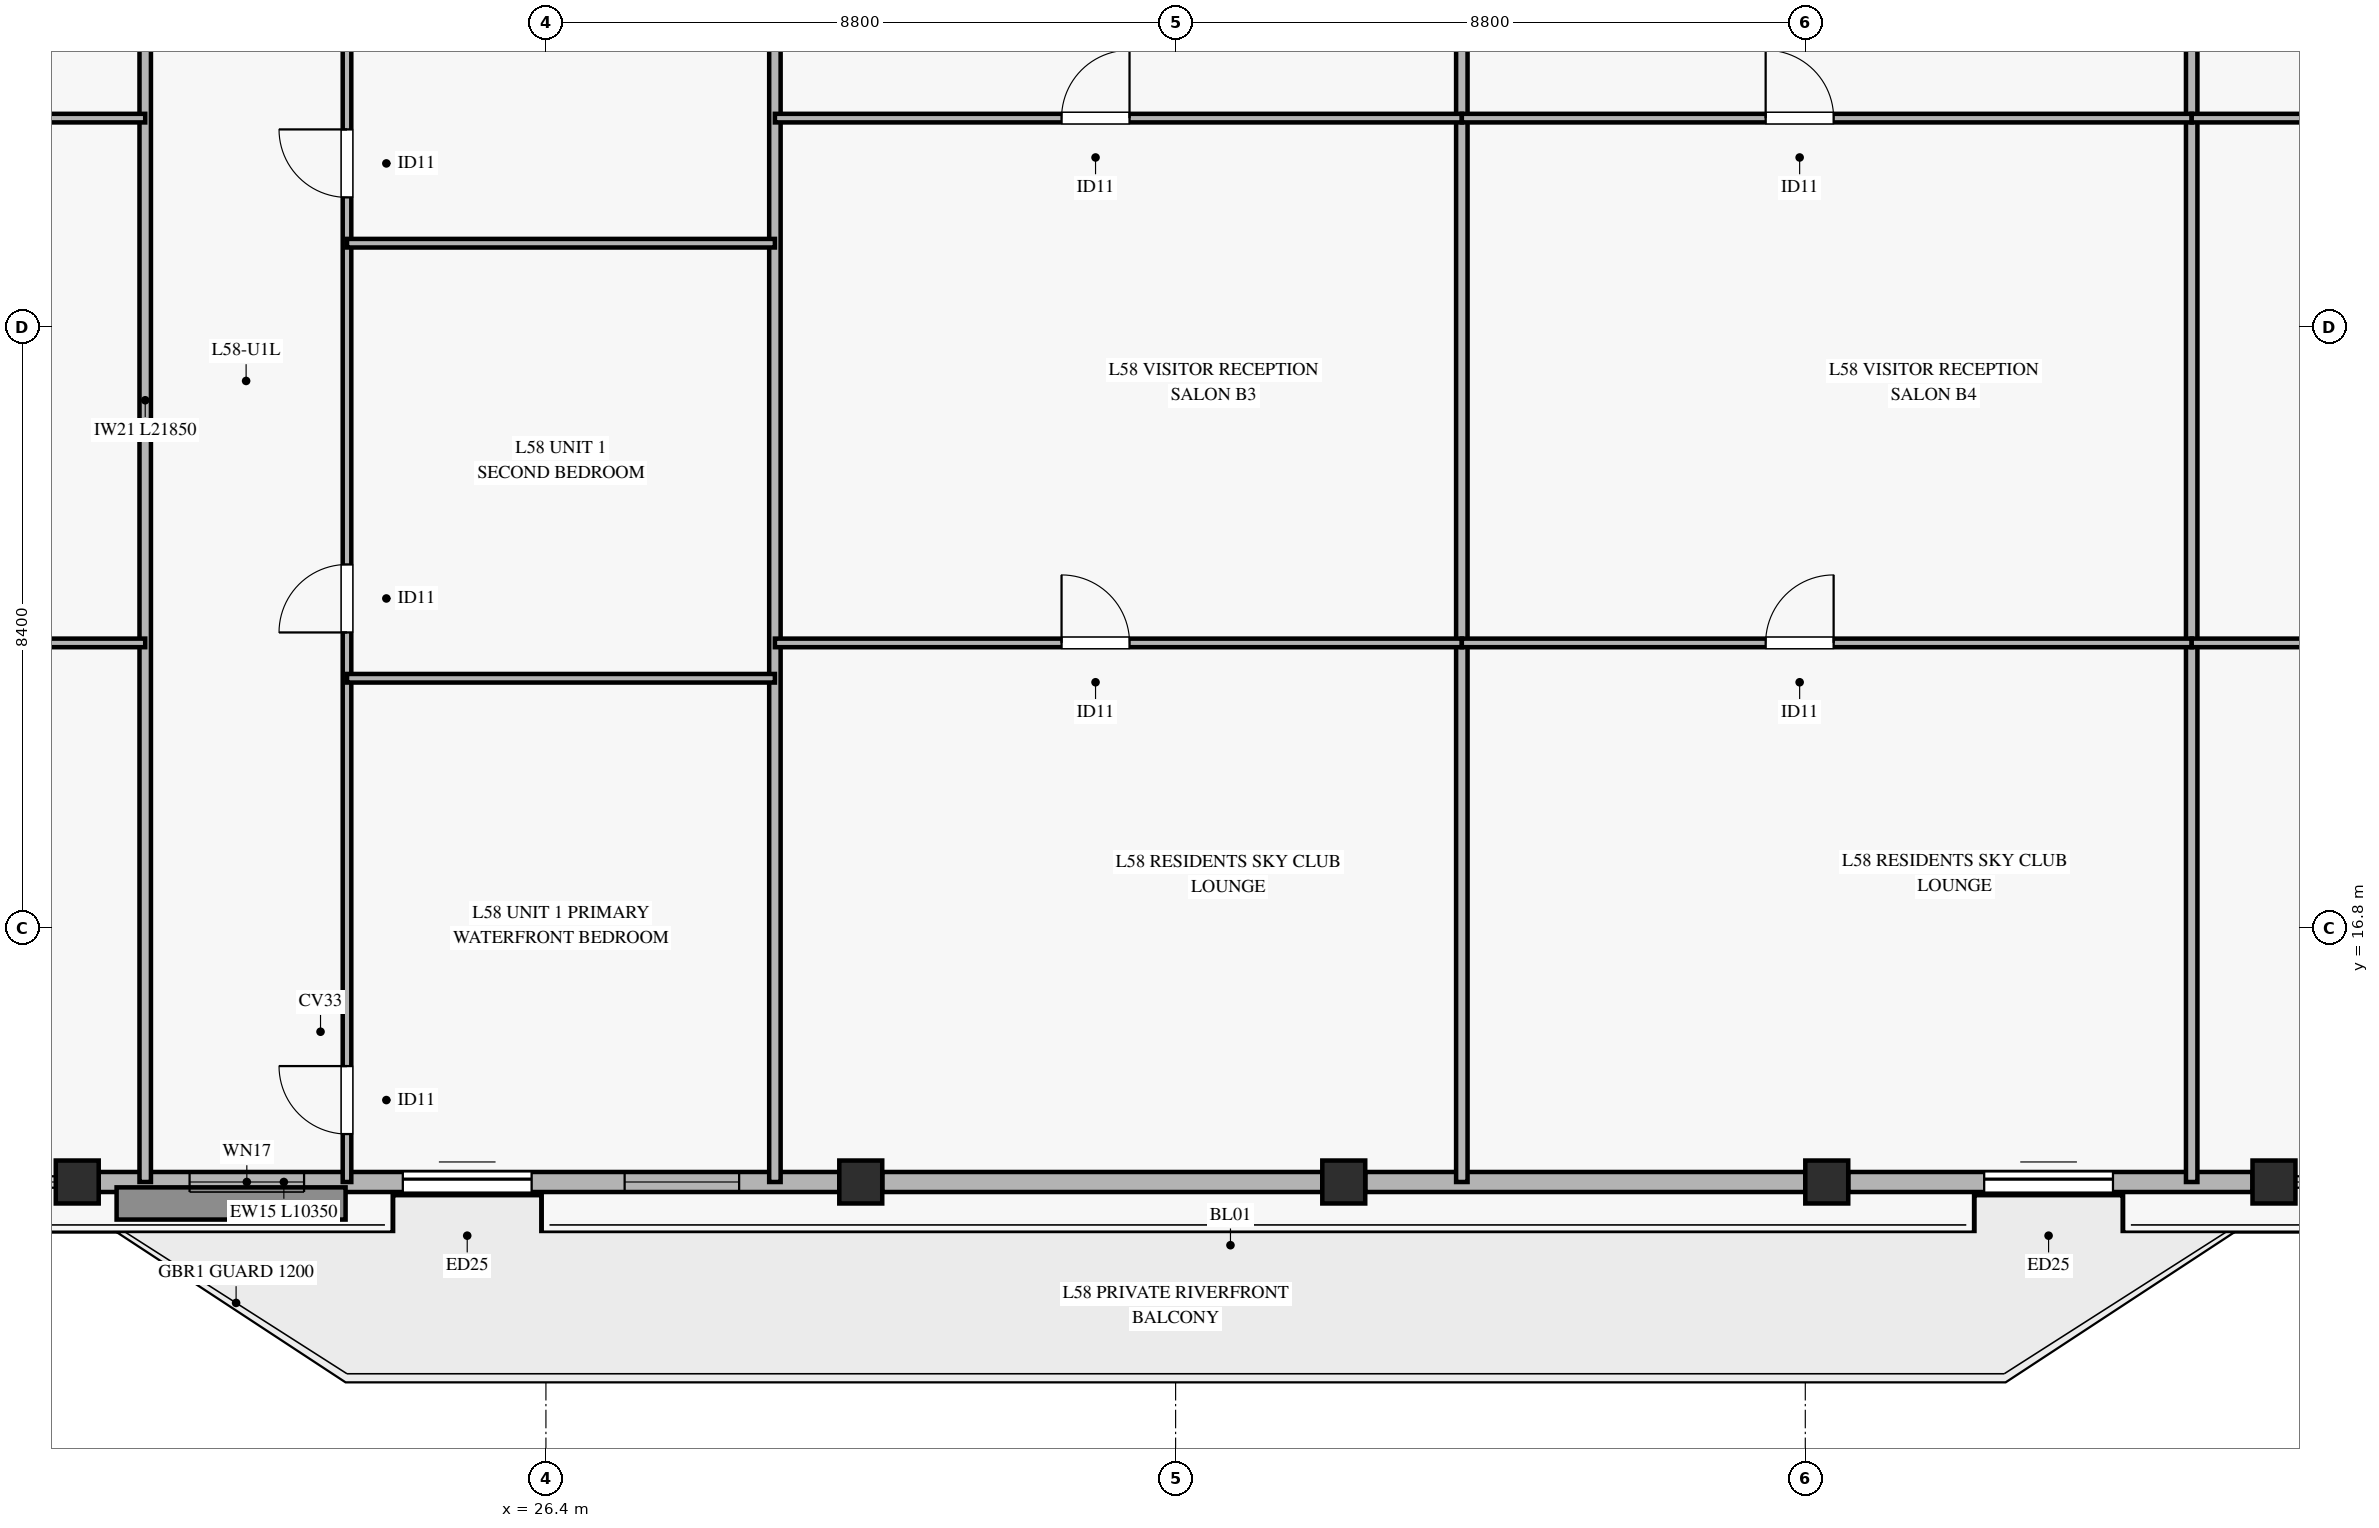
"""IFC4 building model, lengths in metres.
Left out: names, types, materials, properties, quantities, classifications, styles, units other than length and angle.
Written with IfcOpenShell. Run it as: python <this file> out.ifc"""

import sys

from ifc_helpers import new_model, si_unit, direction, frame, frame_2d, origin, origin_2d, place, context, subcontext, project, spatial, rectangle, hollow_rectangle, extrude, source, transform, mapped, element, fill, save


model = new_model("IFC4")
c1 = context("Model", 3, precision=1e-05, world=origin(), true_north=direction((0.0, 1.0)))
c2 = subcontext(c1, "Body", "Model", "MODEL_VIEW")
j1 = project(units=[si_unit("LENGTHUNIT", "METRE"), si_unit("PLANEANGLEUNIT", "RADIAN")], contexts=[c1])
p1 = place(None, origin())
s1 = spatial("IfcSite", under=j1, at=p1, CompositionType="ELEMENT")
p2 = place(p1, origin())
s2 = spatial("IfcBuilding", under=s1, at=p2, CompositionType="ELEMENT")
p3 = place(p2, frame((0.0, 0.0, 230.4)))
s3 = spatial("IfcBuildingStorey", under=s2, at=p3, CompositionType="ELEMENT", Elevation=230.4)
m1 = source(origin(), c2, "Body", "SweptSolid", [
    extrude(hollow_rectangle(XDim=0.6, YDim=0.6, WallThickness=0.028, at=origin_2d()), origin(), (0.0, 0.0, 1.0), 3.185),
])
for number, where, z_axis, x_axis in (
    (1, (19.85, 13.25, 0.0), (0.0, 0.0, 1.0), (1.0, 0.0, 0.0)),
    (2, (30.8, 13.25, 0.0), (0.0, 0.0, 1.0), (1.0, 0.0, 0.0)),
    (3, (37.55, 13.25, 0.0), (0.0, 0.0, 1.0), (1.0, 0.0, 0.0)),
    (4, (44.3, 13.25, 0.0), (0.0, 0.0, 1.0), (1.0, 0.0, 0.0)),
    (5, (50.55, 13.25, 0.0), (0.0, 0.0, 1.0), (1.0, 0.0, 0.0)),
):
    element("IfcColumn", number, at=place(p3, frame(where, z_axis=z_axis, x_axis=x_axis)), inside=s3, PredefinedType="COLUMN", context=c2, shape_type="MappedRepresentation", body=[
        mapped(m1, transform((0.0, 0.0, 0.0), x_axis=(1.0, 0.0, 0.0), y_axis=(0.0, 1.0, 0.0), z_axis=(0.0, 0.0, 1.0), scale=1.0)),
    ])
p4 = place(p3, frame((20.15, 13.25, 0.0), z_axis=(0.0, 0.0, 1.0), x_axis=(1.0, 0.0, 0.0)))
e6 = element("IfcWall", 6, at=p4, inside=s3, PredefinedType="SOLIDWALL", context=c2, shape_type="SweptSolid", body=[
    extrude(rectangle(XDim=10.35, YDim=0.28, at=frame_2d((5.175, 0.0))), origin(), (0.0, 0.0, 1.0), 2.815),
])
p5 = place(p4, frame((4.25, 0.0, 0.0)))
e7 = element("IfcOpeningElement", 7, at=p5, cuts=e6, PredefinedType="OPENING", context=c2, shape_type="SweptSolid", body=[
    extrude(rectangle(XDim=1.8, YDim=2.25, at=frame_2d((0.9, 1.125))), frame((0.0, 0.15, 0.0), z_axis=(0.0, -1.0, 0.0), x_axis=(1.0, 0.0, 0.0)), (0.0, 0.0, 1.0), 0.3),
])
p6 = place(p4, frame((1.27, 0.0, 0.45)))
e8 = element("IfcOpeningElement", 8, at=p6, cuts=e6, PredefinedType="OPENING", context=c2, shape_type="SweptSolid", body=[
    extrude(rectangle(XDim=1.6, YDim=2.0, at=frame_2d((0.8, 1.0))), frame((0.0, 0.15, 0.0), z_axis=(0.0, -1.0, 0.0), x_axis=(1.0, 0.0, 0.0)), (0.0, 0.0, 1.0), 0.3),
])
p7 = place(p4, frame((7.35, 0.0, 0.45)))
e9 = element("IfcOpeningElement", 9, at=p7, cuts=e6, PredefinedType="OPENING", context=c2, shape_type="SweptSolid", body=[
    extrude(rectangle(XDim=1.6, YDim=2.0, at=frame_2d((0.8, 1.0))), frame((0.0, 0.15, 0.0), z_axis=(0.0, -1.0, 0.0), x_axis=(1.0, 0.0, 0.0)), (0.0, 0.0, 1.0), 0.3),
])
for number, where, z_axis, x_axis in (
    (10, (31.1, 13.25, 0.0), (0.0, 0.0, 1.0), (1.0, 0.0, 0.0)),
    (11, (37.85, 13.25, 0.0), (0.0, 0.0, 1.0), (1.0, 0.0, 0.0)),
):
    element("IfcWall", number, at=place(p3, frame(where, z_axis=z_axis, x_axis=x_axis)), inside=s3, PredefinedType="SOLIDWALL", context=c2, shape_type="SweptSolid", body=[
        extrude(rectangle(XDim=6.15, YDim=0.28, at=frame_2d((3.075, 0.0))), origin(), (0.0, 0.0, 1.0), 2.815),
    ])
p8 = place(p3, frame((44.6, 13.25, 0.0), z_axis=(0.0, 0.0, 1.0), x_axis=(1.0, 0.0, 0.0)))
e12 = element("IfcWall", 12, at=p8, inside=s3, PredefinedType="SOLIDWALL", context=c2, shape_type="SweptSolid", body=[
    extrude(rectangle(XDim=5.65, YDim=0.28, at=frame_2d((2.825, 0.0))), origin(), (0.0, 0.0, 1.0), 2.815),
])
p9 = place(p8, frame((1.9, 0.0, 0.0)))
e13 = element("IfcOpeningElement", 13, at=p9, cuts=e12, PredefinedType="OPENING", context=c2, shape_type="SweptSolid", body=[
    extrude(rectangle(XDim=1.8, YDim=2.25, at=frame_2d((0.9, 1.125))), frame((0.0, 0.15, 0.0), z_axis=(0.0, -1.0, 0.0), x_axis=(1.0, 0.0, 0.0)), (0.0, 0.0, 1.0), 0.3),
])
for number, where, z_axis, x_axis in (
    (14, (20.8, 13.25, 0.0), (0.0, 0.0, 1.0), (0.0, 1.0, 0.0)),
    (15, (29.6, 13.25, 0.0), (0.0, 0.0, 1.0), (0.0, 1.0, 0.0)),
    (16, (39.2, 13.25, 0.0), (0.0, 0.0, 1.0), (0.0, 1.0, 0.0)),
    (17, (49.4, 13.25, 0.0), (0.0, 0.0, 1.0), (0.0, 1.0, 0.0)),
):
    element("IfcWall", number, at=place(p3, frame(where, z_axis=z_axis, x_axis=x_axis)), inside=s3, PredefinedType="PARTITIONING", context=c2, shape_type="SweptSolid", body=[
        extrude(rectangle(XDim=21.85, YDim=0.16, at=frame_2d((10.925, 0.0))), origin(), (0.0, 0.0, 1.0), 2.77),
    ])
p10 = place(p3, frame((7.533, 20.784, 0.0), z_axis=(0.0, 0.0, 1.0), x_axis=(1.0, 0.0, 0.0)))
e18 = element("IfcWall", 18, at=p10, inside=s3, PredefinedType="PARTITIONING", context=c2, shape_type="SweptSolid", body=[
    extrude(rectangle(XDim=13.267, YDim=0.12, at=frame_2d((6.634, 0.0))), origin(), (0.0, 0.0, 1.0), 2.37),
])
p11 = place(p10, frame((5.593, 0.0, 0.0)))
e19 = element("IfcOpeningElement", 19, at=p11, cuts=e18, PredefinedType="OPENING", context=c2, shape_type="SweptSolid", body=[
    extrude(rectangle(XDim=0.95, YDim=2.1, at=frame_2d((0.475, 1.05))), frame((0.0, 0.07, 0.0), z_axis=(0.0, -1.0, 0.0), x_axis=(1.0, 0.0, 0.0)), (0.0, 0.0, 1.0), 0.14),
])
p12 = place(p3, frame((7.533, 28.118, 0.0), z_axis=(0.0, 0.0, 1.0), x_axis=(1.0, 0.0, 0.0)))
e20 = element("IfcWall", 20, at=p12, inside=s3, PredefinedType="PARTITIONING", context=c2, shape_type="SweptSolid", body=[
    extrude(rectangle(XDim=13.267, YDim=0.12, at=frame_2d((6.634, 0.0))), origin(), (0.0, 0.0, 1.0), 2.37),
])
p13 = place(p12, frame((5.593, 0.0, 0.0)))
e21 = element("IfcOpeningElement", 21, at=p13, cuts=e20, PredefinedType="OPENING", context=c2, shape_type="SweptSolid", body=[
    extrude(rectangle(XDim=0.95, YDim=2.1, at=frame_2d((0.475, 1.05))), frame((0.0, 0.07, 0.0), z_axis=(0.0, -1.0, 0.0), x_axis=(1.0, 0.0, 0.0)), (0.0, 0.0, 1.0), 0.14),
])
p14 = place(p3, frame((23.62, 13.25, 0.0), z_axis=(0.0, 0.0, 1.0), x_axis=(0.0, 1.0, 0.0)))
e22 = element("IfcWall", 22, at=p14, inside=s3, PredefinedType="PARTITIONING", context=c2, shape_type="SweptSolid", body=[
    extrude(rectangle(XDim=19.2, YDim=0.12, at=frame_2d((9.6, 0.0))), origin(), (0.0, 0.0, 1.0), 2.77),
])
p15 = place(p14, frame((0.67, 0.0, 0.0)))
e23 = element("IfcOpeningElement", 23, at=p15, cuts=e22, PredefinedType="OPENING", context=c2, shape_type="SweptSolid", body=[
    extrude(rectangle(XDim=0.95, YDim=2.1, at=frame_2d((0.475, 1.05))), frame((0.0, 0.07, 0.0), z_axis=(0.0, -1.0, 0.0), x_axis=(1.0, 0.0, 0.0)), (0.0, 0.0, 1.0), 0.14),
])
p16 = place(p14, frame((7.68, 0.0, 0.0)))
e24 = element("IfcOpeningElement", 24, at=p16, cuts=e22, PredefinedType="OPENING", context=c2, shape_type="SweptSolid", body=[
    extrude(rectangle(XDim=0.95, YDim=2.1, at=frame_2d((0.475, 1.05))), frame((0.0, 0.07, 0.0), z_axis=(0.0, -1.0, 0.0), x_axis=(1.0, 0.0, 0.0)), (0.0, 0.0, 1.0), 0.14),
])
p17 = place(p14, frame((13.76, 0.0, 0.0)))
e25 = element("IfcOpeningElement", 25, at=p17, cuts=e22, PredefinedType="OPENING", context=c2, shape_type="SweptSolid", body=[
    extrude(rectangle(XDim=0.95, YDim=2.1, at=frame_2d((0.475, 1.05))), frame((0.0, 0.07, 0.0), z_axis=(0.0, -1.0, 0.0), x_axis=(1.0, 0.0, 0.0)), (0.0, 0.0, 1.0), 0.14),
])
for number, where, z_axis, x_axis in (
    (26, (23.62, 20.29, 0.0), (0.0, 0.0, 1.0), (1.0, 0.0, 0.0)),
    (27, (23.62, 26.37, 0.0), (0.0, 0.0, 1.0), (1.0, 0.0, 0.0)),
):
    element("IfcWall", number, at=place(p3, frame(where, z_axis=z_axis, x_axis=x_axis)), inside=s3, PredefinedType="PARTITIONING", context=c2, shape_type="SweptSolid", body=[
        extrude(rectangle(XDim=5.98, YDim=0.12, at=frame_2d((2.99, 0.0))), origin(), (0.0, 0.0, 1.0), 3.185),
    ])
p18 = place(p3, frame((29.6, 20.784, 0.0), z_axis=(0.0, 0.0, 1.0), x_axis=(1.0, 0.0, 0.0)))
e28 = element("IfcWall", 28, at=p18, inside=s3, PredefinedType="PARTITIONING", context=c2, shape_type="SweptSolid", body=[
    extrude(rectangle(XDim=9.6, YDim=0.12, at=frame_2d((4.8, 0.0))), origin(), (0.0, 0.0, 1.0), 2.37),
])
p19 = place(p18, frame((4.006, 0.0, 0.0)))
e29 = element("IfcOpeningElement", 29, at=p19, cuts=e28, PredefinedType="OPENING", context=c2, shape_type="SweptSolid", body=[
    extrude(rectangle(XDim=0.95, YDim=2.1, at=frame_2d((0.475, 1.05))), frame((0.0, 0.07, 0.0), z_axis=(0.0, -1.0, 0.0), x_axis=(1.0, 0.0, 0.0)), (0.0, 0.0, 1.0), 0.14),
])
p20 = place(p3, frame((29.6, 28.118, 0.0), z_axis=(0.0, 0.0, 1.0), x_axis=(1.0, 0.0, 0.0)))
e30 = element("IfcWall", 30, at=p20, inside=s3, PredefinedType="PARTITIONING", context=c2, shape_type="SweptSolid", body=[
    extrude(rectangle(XDim=9.6, YDim=0.12, at=frame_2d((4.8, 0.0))), origin(), (0.0, 0.0, 1.0), 2.37),
])
p21 = place(p20, frame((4.006, 0.0, 0.0)))
e31 = element("IfcOpeningElement", 31, at=p21, cuts=e30, PredefinedType="OPENING", context=c2, shape_type="SweptSolid", body=[
    extrude(rectangle(XDim=0.95, YDim=2.1, at=frame_2d((0.475, 1.05))), frame((0.0, 0.07, 0.0), z_axis=(0.0, -1.0, 0.0), x_axis=(1.0, 0.0, 0.0)), (0.0, 0.0, 1.0), 0.14),
])
p22 = place(p3, frame((39.2, 20.784, 0.0), z_axis=(0.0, 0.0, 1.0), x_axis=(1.0, 0.0, 0.0)))
e32 = element("IfcWall", 32, at=p22, inside=s3, PredefinedType="PARTITIONING", context=c2, shape_type="SweptSolid", body=[
    extrude(rectangle(XDim=10.2, YDim=0.12, at=frame_2d((5.1, 0.0))), origin(), (0.0, 0.0, 1.0), 2.37),
])
p23 = place(p22, frame((4.246, 0.0, 0.0)))
e33 = element("IfcOpeningElement", 33, at=p23, cuts=e32, PredefinedType="OPENING", context=c2, shape_type="SweptSolid", body=[
    extrude(rectangle(XDim=0.95, YDim=2.1, at=frame_2d((0.475, 1.05))), frame((0.0, 0.07, 0.0), z_axis=(0.0, -1.0, 0.0), x_axis=(1.0, 0.0, 0.0)), (0.0, 0.0, 1.0), 0.14),
])
p24 = place(p3, frame((39.2, 28.118, 0.0), z_axis=(0.0, 0.0, 1.0), x_axis=(1.0, 0.0, 0.0)))
e34 = element("IfcWall", 34, at=p24, inside=s3, PredefinedType="PARTITIONING", context=c2, shape_type="SweptSolid", body=[
    extrude(rectangle(XDim=10.2, YDim=0.12, at=frame_2d((5.1, 0.0))), origin(), (0.0, 0.0, 1.0), 2.37),
])
p25 = place(p24, frame((4.246, 0.0, 0.0)))
e35 = element("IfcOpeningElement", 35, at=p25, cuts=e34, PredefinedType="OPENING", context=c2, shape_type="SweptSolid", body=[
    extrude(rectangle(XDim=0.95, YDim=2.1, at=frame_2d((0.475, 1.05))), frame((0.0, 0.07, 0.0), z_axis=(0.0, -1.0, 0.0), x_axis=(1.0, 0.0, 0.0)), (0.0, 0.0, 1.0), 0.14),
])
p26 = place(p3, frame((49.4, 20.784, 0.0), z_axis=(0.0, 0.0, 1.0), x_axis=(1.0, 0.0, 0.0)))
e36 = element("IfcWall", 36, at=p26, inside=s3, PredefinedType="PARTITIONING", context=c2, shape_type="SweptSolid", body=[
    extrude(rectangle(XDim=13.467, YDim=0.12, at=frame_2d((6.733, 0.0))), origin(), (0.0, 0.0, 1.0), 2.37),
])
p27 = place(p26, frame((5.473, 0.0, 0.0)))
e37 = element("IfcOpeningElement", 37, at=p27, cuts=e36, PredefinedType="OPENING", context=c2, shape_type="SweptSolid", body=[
    extrude(rectangle(XDim=0.95, YDim=2.1, at=frame_2d((0.475, 1.05))), frame((0.0, 0.07, 0.0), z_axis=(0.0, -1.0, 0.0), x_axis=(1.0, 0.0, 0.0)), (0.0, 0.0, 1.0), 0.14),
])
p28 = place(p3, frame((49.4, 28.118, 0.0), z_axis=(0.0, 0.0, 1.0), x_axis=(1.0, 0.0, 0.0)))
e38 = element("IfcWall", 38, at=p28, inside=s3, PredefinedType="PARTITIONING", context=c2, shape_type="SweptSolid", body=[
    extrude(rectangle(XDim=13.467, YDim=0.12, at=frame_2d((6.733, 0.0))), origin(), (0.0, 0.0, 1.0), 2.37),
])
p29 = place(p28, frame((5.473, 0.0, 0.0)))
e39 = element("IfcOpeningElement", 39, at=p29, cuts=e38, PredefinedType="OPENING", context=c2, shape_type="SweptSolid", body=[
    extrude(rectangle(XDim=0.95, YDim=2.1, at=frame_2d((0.475, 1.05))), frame((0.0, 0.07, 0.0), z_axis=(0.0, -1.0, 0.0), x_axis=(1.0, 0.0, 0.0)), (0.0, 0.0, 1.0), 0.14),
])
m2 = source(origin(), c2, "Body", "SweptSolid", [
    extrude(rectangle(XDim=1.8, YDim=2.25, at=frame_2d((0.9, 1.125))), frame((0.0, 0.025, 0.0), z_axis=(0.0, -1.0, 0.0), x_axis=(1.0, 0.0, 0.0)), (0.0, 0.0, 1.0), 0.05),
])
p30 = place(p5, origin())
e40 = element("IfcDoor", 40, at=p30, inside=s3, OperationType="SLIDING_TO_LEFT", PredefinedType="DOOR", context=c2, shape_type="MappedRepresentation", body=[
    mapped(m2, transform((0.0, 0.0, 0.0), x_axis=(1.0, 0.0, 0.0), y_axis=(0.0, 1.0, 0.0), z_axis=(0.0, 0.0, 1.0), scale=1.0)),
])
fill(e7, e40)
m3 = source(origin(), c2, "Body", "SweptSolid", [
    extrude(rectangle(XDim=1.6, YDim=2.0, at=frame_2d((0.8, 1.0))), frame((0.0, 0.03, 0.0), z_axis=(0.0, -1.0, 0.0), x_axis=(1.0, 0.0, 0.0)), (0.0, 0.0, 1.0), 0.06),
])
p31 = place(p6, origin())
e41 = element("IfcWindow", 41, at=p31, inside=s3, PartitioningType="SINGLE_PANEL", PredefinedType="WINDOW", context=c2, shape_type="MappedRepresentation", body=[
    mapped(m3, transform((0.0, 0.0, 0.0), x_axis=(1.0, 0.0, 0.0), y_axis=(0.0, 1.0, 0.0), z_axis=(0.0, 0.0, 1.0), scale=1.0)),
])
fill(e8, e41)
p32 = place(p7, origin())
e42 = element("IfcWindow", 42, at=p32, inside=s3, PartitioningType="SINGLE_PANEL", PredefinedType="WINDOW", context=c2, shape_type="MappedRepresentation", body=[
    mapped(m3, transform((0.0, 0.0, 0.0), x_axis=(1.0, 0.0, 0.0), y_axis=(0.0, 1.0, 0.0), z_axis=(0.0, 0.0, 1.0), scale=1.0)),
])
fill(e9, e42)
p33 = place(p9, origin())
e43 = element("IfcDoor", 43, at=p33, inside=s3, OperationType="SLIDING_TO_LEFT", PredefinedType="DOOR", context=c2, shape_type="MappedRepresentation", body=[
    mapped(m2, transform((0.0, 0.0, 0.0), x_axis=(1.0, 0.0, 0.0), y_axis=(0.0, 1.0, 0.0), z_axis=(0.0, 0.0, 1.0), scale=1.0)),
])
fill(e13, e43)
m4 = source(origin(), c2, "Body", "SweptSolid", [
    extrude(rectangle(XDim=0.95, YDim=2.1, at=frame_2d((0.475, 1.05))), frame((0.0, 0.025, 0.0), z_axis=(0.0, -1.0, 0.0), x_axis=(1.0, 0.0, 0.0)), (0.0, 0.0, 1.0), 0.05),
])
p34 = place(p15, origin())
e44 = element("IfcDoor", 44, at=p34, inside=s3, OperationType="SINGLE_SWING_RIGHT", PredefinedType="DOOR", context=c2, shape_type="MappedRepresentation", body=[
    mapped(m4, transform((0.0, 0.0, 0.0), x_axis=(1.0, 0.0, 0.0), y_axis=(0.0, 1.0, 0.0), z_axis=(0.0, 0.0, 1.0), scale=1.0)),
])
fill(e23, e44)
p35 = place(p16, origin())
e45 = element("IfcDoor", 45, at=p35, inside=s3, OperationType="SINGLE_SWING_LEFT", PredefinedType="DOOR", context=c2, shape_type="MappedRepresentation", body=[
    mapped(m4, transform((0.0, 0.0, 0.0), x_axis=(1.0, 0.0, 0.0), y_axis=(0.0, 1.0, 0.0), z_axis=(0.0, 0.0, 1.0), scale=1.0)),
])
fill(e24, e45)
p36 = place(p17, origin())
e46 = element("IfcDoor", 46, at=p36, inside=s3, OperationType="SINGLE_SWING_RIGHT", PredefinedType="DOOR", context=c2, shape_type="MappedRepresentation", body=[
    mapped(m4, transform((0.0, 0.0, 0.0), x_axis=(1.0, 0.0, 0.0), y_axis=(0.0, 1.0, 0.0), z_axis=(0.0, 0.0, 1.0), scale=1.0)),
])
fill(e25, e46)
p37 = place(p21, origin())
e47 = element("IfcDoor", 47, at=p37, inside=s3, OperationType="SINGLE_SWING_RIGHT", PredefinedType="DOOR", context=c2, shape_type="MappedRepresentation", body=[
    mapped(m4, transform((0.0, 0.0, 0.0), x_axis=(1.0, 0.0, 0.0), y_axis=(0.0, 1.0, 0.0), z_axis=(0.0, 0.0, 1.0), scale=1.0)),
])
fill(e31, e47)
p38 = place(p19, origin())
e48 = element("IfcDoor", 48, at=p38, inside=s3, OperationType="SINGLE_SWING_LEFT", PredefinedType="DOOR", context=c2, shape_type="MappedRepresentation", body=[
    mapped(m4, transform((0.0, 0.0, 0.0), x_axis=(1.0, 0.0, 0.0), y_axis=(0.0, 1.0, 0.0), z_axis=(0.0, 0.0, 1.0), scale=1.0)),
])
fill(e29, e48)
p39 = place(p25, origin())
e49 = element("IfcDoor", 49, at=p39, inside=s3, OperationType="SINGLE_SWING_LEFT", PredefinedType="DOOR", context=c2, shape_type="MappedRepresentation", body=[
    mapped(m4, transform((0.0, 0.0, 0.0), x_axis=(1.0, 0.0, 0.0), y_axis=(0.0, 1.0, 0.0), z_axis=(0.0, 0.0, 1.0), scale=1.0)),
])
fill(e35, e49)
p40 = place(p23, origin())
e50 = element("IfcDoor", 50, at=p40, inside=s3, OperationType="SINGLE_SWING_RIGHT", PredefinedType="DOOR", context=c2, shape_type="MappedRepresentation", body=[
    mapped(m4, transform((0.0, 0.0, 0.0), x_axis=(1.0, 0.0, 0.0), y_axis=(0.0, 1.0, 0.0), z_axis=(0.0, 0.0, 1.0), scale=1.0)),
])
fill(e33, e50)
save(model, sys.argv[1])
